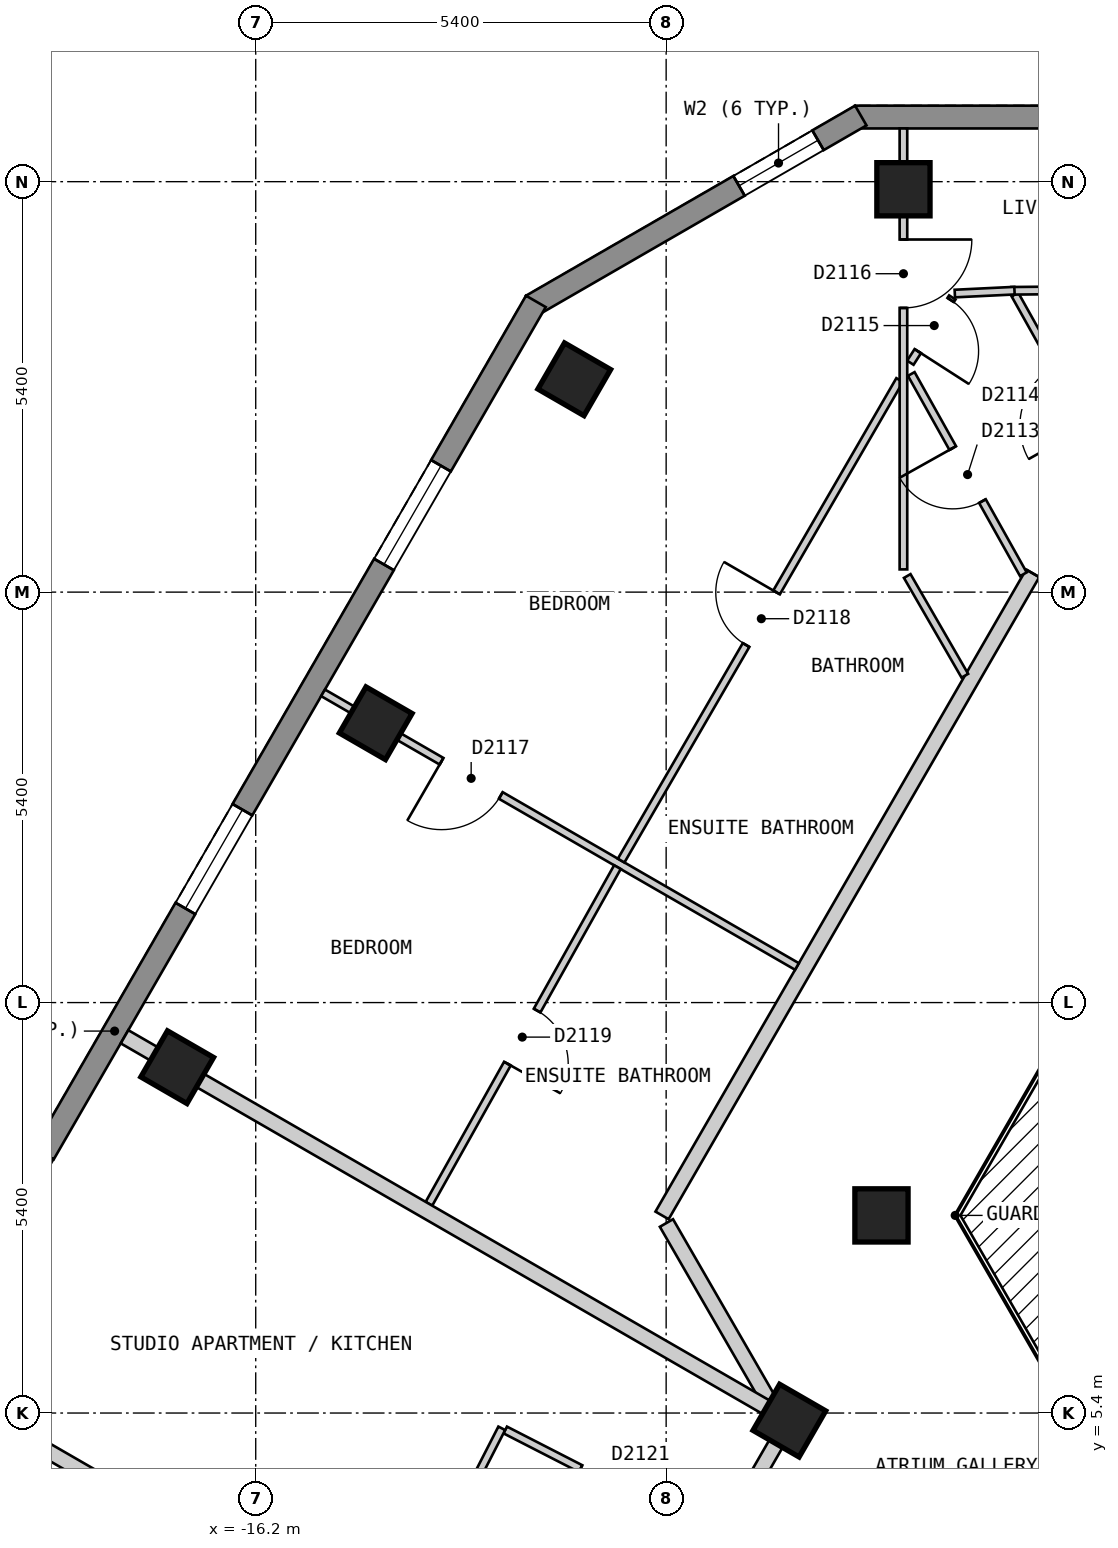
"""IFC4 building model, lengths in metres.
Left out: names, types, materials, properties, quantities, classifications, styles, units other than length and angle.
Written with IfcOpenShell. Run it as: python <this file> out.ifc"""

import sys

from ifc_helpers import new_model, si_unit, direction, frame, frame_2d, origin, origin_2d, place, context, subcontext, project, spatial, polyline, rectangle, outline, extrude, element, fill, save


model = new_model("IFC4")
c1 = context("Model", 3, precision=1e-05, world=origin(), true_north=direction((0.0, 1.0)))
c2 = subcontext(c1, "Body", "Model", "MODEL_VIEW")
j1 = project(units=[si_unit("LENGTHUNIT", "METRE"), si_unit("PLANEANGLEUNIT", "RADIAN")], contexts=[c1])
p1 = place(None, origin())
s1 = spatial("IfcSite", under=j1, at=p1, CompositionType="ELEMENT")
p2 = place(p1, origin())
s2 = spatial("IfcBuilding", under=s1, at=p2, CompositionType="ELEMENT")
p3 = place(p2, frame((0.0, 0.0, 211.8)))
s3 = spatial("IfcBuildingStorey", under=s2, at=p3, CompositionType="ELEMENT", Elevation=211.8)
for number, where, z_axis, x_axis in (
    (1, (-7.678, 21.5, 0.0), (0.0, 0.0, 1.0), (-1.0, 0.0, 0.0)),
    (2, (-12.009, 19.0, 0.0), (0.0, 0.0, 1.0), (-0.5, -0.866, 0.0)),
    (3, (-14.621, 14.475, 0.0), (0.0, 0.0, 1.0), (-0.5, -0.866, 0.0)),
    (4, (-17.233, 9.95, 0.0), (0.0, 0.0, 1.0), (-0.5, -0.866, 0.0)),
    (5, (-7.967, 8.0, 0.0), (0.0, 0.0, 1.0), (1.0, 0.0, 0.0)),
    (6, (-9.179, 5.3, 0.0), (0.0, 0.0, 1.0), (-0.5, -0.866, 0.0)),
):
    element("IfcColumn", number, at=place(p3, frame(where, z_axis=z_axis, x_axis=x_axis)), inside=s3, PredefinedType="COLUMN", context=c2, shape_type="SweptSolid", body=[
        extrude(rectangle(XDim=0.7, YDim=0.7, at=origin_2d()), origin(), (0.0, 0.0, 1.0), 3.0),
    ])
p4 = place(p3, frame((8.314, 22.45, 0.0), z_axis=(0.0, 0.0, 1.0), x_axis=(-1.0, 0.0, 0.0)))
e7 = element("IfcWall", 7, at=p4, inside=s3, PredefinedType="SOLIDWALL", context=c2, shape_type="SweptSolid", body=[
    extrude(outline(polyline([(0.0, -0.15), (16.628, -0.15), (16.548, 0.15), (0.08, 0.15), (0.0, -0.15)])), origin(), (0.0, 0.0, 1.0), 2.7),
])
p5 = place(p4, frame((2.444, 0.0, 0.15)))
e8 = element("IfcOpeningElement", 8, at=p5, cuts=e7, PredefinedType="OPENING", context=c2, shape_type="SweptSolid", body=[
    extrude(rectangle(XDim=1.5, YDim=2.1, at=frame_2d((0.75, 1.05))), frame((0.0, 0.16, 0.0), z_axis=(0.0, -1.0, 0.0), x_axis=(1.0, 0.0, 0.0)), (0.0, 0.0, 1.0), 0.32),
])
p6 = place(p4, frame((7.564, 0.0, 0.15)))
e9 = element("IfcOpeningElement", 9, at=p6, cuts=e7, PredefinedType="OPENING", context=c2, shape_type="SweptSolid", body=[
    extrude(rectangle(XDim=1.5, YDim=2.1, at=frame_2d((0.75, 1.05))), frame((0.0, 0.16, 0.0), z_axis=(0.0, -1.0, 0.0), x_axis=(1.0, 0.0, 0.0)), (0.0, 0.0, 1.0), 0.32),
])
p7 = place(p4, frame((12.683, 0.0, 0.15)))
e10 = element("IfcOpeningElement", 10, at=p7, cuts=e7, PredefinedType="OPENING", context=c2, shape_type="SweptSolid", body=[
    extrude(rectangle(XDim=1.5, YDim=2.1, at=frame_2d((0.75, 1.05))), frame((0.0, 0.16, 0.0), z_axis=(0.0, -1.0, 0.0), x_axis=(1.0, 0.0, 0.0)), (0.0, 0.0, 1.0), 0.32),
])
p8 = place(p3, frame((-8.239, 22.47, 0.0), z_axis=(0.0, 0.0, 1.0), x_axis=(-0.866022959057, -0.500004234368, 0.0)))
e11 = element("IfcWall", 11, at=p8, inside=s3, PredefinedType="SOLIDWALL", context=c2, shape_type="SweptSolid", body=[
    extrude(outline(polyline([(0.0, -0.15), (5.0, -0.15), (4.92, 0.15), (0.08, 0.15), (0.0, -0.15)])), origin(), (0.0, 0.0, 1.0), 2.7),
])
p9 = place(p8, frame((0.65, 0.0, 0.15)))
e12 = element("IfcOpeningElement", 12, at=p9, cuts=e11, PredefinedType="OPENING", context=c2, shape_type="SweptSolid", body=[
    extrude(rectangle(XDim=1.2, YDim=2.1, at=frame_2d((0.6, 1.05))), frame((0.0, 0.16, 0.0), z_axis=(0.0, -1.0, 0.0), x_axis=(1.0, 0.0, 0.0)), (0.0, 0.0, 1.0), 0.32),
])
p10 = place(p3, frame((-12.514, 20.025, 0.0), z_axis=(0.0, 0.0, 1.0), x_axis=(-0.500003656944, -0.866023292436, 0.0)))
e13 = element("IfcWall", 13, at=p10, inside=s3, PredefinedType="SOLIDWALL", context=c2, shape_type="SweptSolid", body=[
    extrude(outline(polyline([(0.0, -0.15), (22.17, -0.15), (22.09, 0.15), (0.08, 0.15), (0.0, -0.15)])), origin(), (0.0, 0.0, 1.0), 2.7),
])
p11 = place(p10, frame((2.497, 0.0, 0.15)))
e14 = element("IfcOpeningElement", 14, at=p11, cuts=e13, PredefinedType="OPENING", context=c2, shape_type="SweptSolid", body=[
    extrude(rectangle(XDim=1.5, YDim=2.1, at=frame_2d((0.75, 1.05))), frame((0.0, 0.16, 0.0), z_axis=(0.0, -1.0, 0.0), x_axis=(1.0, 0.0, 0.0)), (0.0, 0.0, 1.0), 0.32),
])
p12 = place(p10, frame((7.722, 0.0, 0.15)))
e15 = element("IfcOpeningElement", 15, at=p12, cuts=e13, PredefinedType="OPENING", context=c2, shape_type="SweptSolid", body=[
    extrude(rectangle(XDim=1.5, YDim=2.1, at=frame_2d((0.75, 1.05))), frame((0.0, 0.16, 0.0), z_axis=(0.0, -1.0, 0.0), x_axis=(1.0, 0.0, 0.0)), (0.0, 0.0, 1.0), 0.32),
])
p13 = place(p10, frame((12.948, 0.0, 0.15)))
e16 = element("IfcOpeningElement", 16, at=p13, cuts=e13, PredefinedType="OPENING", context=c2, shape_type="SweptSolid", body=[
    extrude(rectangle(XDim=1.5, YDim=2.1, at=frame_2d((0.75, 1.05))), frame((0.0, 0.16, 0.0), z_axis=(0.0, -1.0, 0.0), x_axis=(1.0, 0.0, 0.0)), (0.0, 0.0, 1.0), 0.32),
])
p14 = place(p10, frame((18.173, 0.0, 0.15)))
e17 = element("IfcOpeningElement", 17, at=p14, cuts=e13, PredefinedType="OPENING", context=c2, shape_type="SweptSolid", body=[
    extrude(rectangle(XDim=1.5, YDim=2.1, at=frame_2d((0.75, 1.05))), frame((0.0, 0.16, 0.0), z_axis=(0.0, -1.0, 0.0), x_axis=(1.0, 0.0, 0.0)), (0.0, 0.0, 1.0), 0.32),
])
p15 = place(p3, frame((-10.796, 7.9, 0.0), z_axis=(0.0, 0.0, 1.0), x_axis=(0.499698840221, -0.866199208659, 0.0)))
e18 = element("IfcWall", 18, at=p15, inside=s3, PredefinedType="PARTITIONING", context=c2, shape_type="SweptSolid", body=[
    extrude(rectangle(XDim=2.685, YDim=0.2, at=frame_2d((1.343, 0.0))), origin(), (0.0, 0.0, 1.0), 2.7),
])
p16 = place(p3, frame((-13.106, -1.5, 0.0), z_axis=(0.0, 0.0, 1.0), x_axis=(0.500025705601, 0.86601056214, 0.0)))
e19 = element("IfcWall", 19, at=p16, inside=s3, PredefinedType="PARTITIONING", context=c2, shape_type="SweptSolid", body=[
    extrude(rectangle(XDim=7.735, YDim=0.2, at=frame_2d((3.868, 0.0))), origin(), (0.0, 0.0, 1.0), 2.7),
])
p17 = place(p16, frame((4.748, 0.0, 0.0)))
e20 = element("IfcOpeningElement", 20, at=p17, cuts=e19, PredefinedType="OPENING", context=c2, shape_type="SweptSolid", body=[
    extrude(rectangle(XDim=1.0, YDim=2.1, at=frame_2d((0.5, 1.05))), frame((0.0, 0.11, 0.0), z_axis=(0.0, -1.0, 0.0), x_axis=(1.0, 0.0, 0.0)), (0.0, 0.0, 1.0), 0.22),
])
p18 = place(p3, frame((-10.854, 8.0, 0.0), z_axis=(0.0, 0.0, 1.0), x_axis=(0.499997637144, 0.866026767976, 0.0)))
e21 = element("IfcWall", 21, at=p18, inside=s3, PredefinedType="PARTITIONING", context=c2, shape_type="SweptSolid", body=[
    extrude(rectangle(XDim=10.854, YDim=0.2, at=frame_2d((5.427, 0.0))), origin(), (0.0, 0.0, 1.0), 2.7),
])
p19 = place(p18, frame((9.754, 0.0, 0.0)))
e22 = element("IfcOpeningElement", 22, at=p19, cuts=e21, PredefinedType="OPENING", context=c2, shape_type="SweptSolid", body=[
    extrude(rectangle(XDim=1.0, YDim=2.1, at=frame_2d((0.5, 1.05))), frame((0.0, 0.11, 0.0), z_axis=(0.0, -1.0, 0.0), x_axis=(1.0, 0.0, 0.0)), (0.0, 0.0, 1.0), 0.22),
])
p20 = place(p3, frame((-7.628, 16.412, 0.0), z_axis=(0.0, 0.0, 1.0), x_axis=(0.500159472144, -0.86593331292, 0.0)))
e23 = element("IfcWall", 23, at=p20, inside=s3, PredefinedType="PARTITIONING", context=c2, shape_type="SweptSolid", body=[
    extrude(rectangle(XDim=1.515, YDim=0.1, at=frame_2d((0.758, 0.0))), origin(), (0.0, 0.0, 1.0), 2.7),
])
p21 = place(p3, frame((-6.211, 20.115, 0.0), z_axis=(0.0, 0.0, 1.0), x_axis=(0.488221234931, -0.872719901092, 0.0)))
e24 = element("IfcWall", 24, at=p21, inside=s3, PredefinedType="PARTITIONING", context=c2, shape_type="SweptSolid", body=[
    extrude(rectangle(XDim=2.996, YDim=0.1, at=frame_2d((1.498, 0.0))), origin(), (0.0, 0.0, 1.0), 2.7),
])
p22 = place(p21, frame((1.077, 0.0, 0.0)))
e25 = element("IfcOpeningElement", 25, at=p22, cuts=e24, PredefinedType="OPENING", context=c2, shape_type="SweptSolid", body=[
    extrude(rectangle(XDim=0.9, YDim=2.1, at=frame_2d((0.45, 1.05))), frame((0.0, 0.06, 0.0), z_axis=(0.0, -1.0, 0.0), x_axis=(1.0, 0.0, 0.0)), (0.0, 0.0, 1.0), 0.12),
])
p23 = place(p3, frame((-7.575, 19.07, 0.0), z_axis=(0.0, 0.0, 1.0), x_axis=(0.488413788688, -0.872612153834, 0.0)))
e26 = element("IfcWall", 26, at=p23, inside=s3, PredefinedType="PARTITIONING", context=c2, shape_type="SweptSolid", body=[
    extrude(rectangle(XDim=3.02, YDim=0.1, at=frame_2d((1.51, 0.0))), origin(), (0.0, 0.0, 1.0), 2.7),
])
p24 = place(p23, frame((1.117, 0.0, 0.0)))
e27 = element("IfcOpeningElement", 27, at=p24, cuts=e26, PredefinedType="OPENING", context=c2, shape_type="SweptSolid", body=[
    extrude(rectangle(XDim=0.8, YDim=2.1, at=frame_2d((0.4, 1.05))), frame((0.0, 0.06, 0.0), z_axis=(0.0, -1.0, 0.0), x_axis=(1.0, 0.0, 0.0)), (0.0, 0.0, 1.0), 0.12),
])
p25 = place(p3, frame((-12.917, 5.177, 0.0), z_axis=(0.0, 0.0, 1.0), x_axis=(0.889829844516, -0.456292502467, 0.0)))
e28 = element("IfcWall", 28, at=p25, inside=s3, PredefinedType="PARTITIONING", context=c2, shape_type="SweptSolid", body=[
    extrude(rectangle(XDim=3.079, YDim=0.1, at=frame_2d((1.54, 0.0))), origin(), (0.0, 0.0, 1.0), 2.7),
])
p26 = place(p25, frame((1.114, 0.0, 0.0)))
e29 = element("IfcOpeningElement", 29, at=p26, cuts=e28, PredefinedType="OPENING", context=c2, shape_type="SweptSolid", body=[
    extrude(rectangle(XDim=0.9, YDim=2.1, at=frame_2d((0.45, 1.05))), frame((0.0, 0.06, 0.0), z_axis=(0.0, -1.0, 0.0), x_axis=(1.0, 0.0, 0.0)), (0.0, 0.0, 1.0), 0.12),
])
p27 = place(p3, frame((-15.314, 14.875, 0.0), z_axis=(0.0, 0.0, 1.0), x_axis=(0.866001485781, -0.500041424909, 0.0)))
e30 = element("IfcWall", 30, at=p27, inside=s3, PredefinedType="PARTITIONING", context=c2, shape_type="SweptSolid", body=[
    extrude(rectangle(XDim=7.2, YDim=0.1, at=frame_2d((3.6, 0.0))), origin(), (0.0, 0.0, 1.0), 2.7),
])
p28 = place(p27, frame((1.8, 0.0, 0.0)))
e31 = element("IfcOpeningElement", 31, at=p28, cuts=e30, PredefinedType="OPENING", context=c2, shape_type="SweptSolid", body=[
    extrude(rectangle(XDim=0.9, YDim=2.1, at=frame_2d((0.45, 1.05))), frame((0.0, 0.06, 0.0), z_axis=(0.0, -1.0, 0.0), x_axis=(1.0, 0.0, 0.0)), (0.0, 0.0, 1.0), 0.12),
])
p29 = place(p3, frame((-6.259, 20.164, 0.0), z_axis=(0.0, 0.0, 1.0), x_axis=(0.999952982126, 0.009697089139, 0.0)))
e32 = element("IfcWall", 32, at=p29, inside=s3, PredefinedType="PARTITIONING", context=c2, shape_type="SweptSolid", body=[
    extrude(rectangle(XDim=3.6, YDim=0.1, at=frame_2d((1.8, 0.0))), origin(), (0.0, 0.0, 1.0), 2.7),
])
p30 = place(p3, frame((-7.587, 19.218, 0.0), z_axis=(0.0, 0.0, 1.0), x_axis=(0.54066090195, 0.841240624972, 0.0)))
e33 = element("IfcWall", 33, at=p30, inside=s3, PredefinedType="PARTITIONING", context=c2, shape_type="SweptSolid", body=[
    extrude(rectangle(XDim=1.021, YDim=0.1, at=frame_2d((0.51, 0.0))), origin(), (0.0, 0.0, 1.0), 2.7),
])
p31 = place(p30, frame((0.181, 0.0, 0.0)))
e34 = element("IfcOpeningElement", 34, at=p31, cuts=e33, PredefinedType="OPENING", context=c2, shape_type="SweptSolid", body=[
    extrude(rectangle(XDim=0.8, YDim=2.1, at=frame_2d((0.4, 1.05))), frame((0.0, 0.06, 0.0), z_axis=(0.0, -1.0, 0.0), x_axis=(1.0, 0.0, 0.0)), (0.0, 0.0, 1.0), 0.12),
])
p32 = place(p3, frame((-11.392, 12.668, 0.0), z_axis=(0.0, 0.0, 1.0), x_axis=(0.501440551074, 0.865192102217, 0.0)))
e35 = element("IfcWall", 35, at=p32, inside=s3, PredefinedType="PARTITIONING", context=c2, shape_type="SweptSolid", body=[
    extrude(rectangle(XDim=7.307, YDim=0.1, at=frame_2d((3.654, 0.0))), origin(), (0.0, 0.0, 1.0), 2.7),
])
p33 = place(p32, frame((3.278, 0.0, 0.0)))
e36 = element("IfcOpeningElement", 36, at=p33, cuts=e35, PredefinedType="OPENING", context=c2, shape_type="SweptSolid", body=[
    extrude(rectangle(XDim=0.8, YDim=2.1, at=frame_2d((0.4, 1.05))), frame((0.0, 0.06, 0.0), z_axis=(0.0, -1.0, 0.0), x_axis=(1.0, 0.0, 0.0)), (0.0, 0.0, 1.0), 0.12),
])
p34 = place(p3, frame((-13.921, 8.153, 0.0), z_axis=(0.0, 0.0, 1.0), x_axis=(0.488568218554, 0.872525699231, 0.0)))
e37 = element("IfcWall", 37, at=p34, inside=s3, PredefinedType="PARTITIONING", context=c2, shape_type="SweptSolid", body=[
    extrude(rectangle(XDim=5.076, YDim=0.1, at=frame_2d((2.538, 0.0))), origin(), (0.0, 0.0, 1.0), 2.7),
])
p35 = place(p34, frame((2.113, 0.0, 0.0)))
e38 = element("IfcOpeningElement", 38, at=p35, cuts=e37, PredefinedType="OPENING", context=c2, shape_type="SweptSolid", body=[
    extrude(rectangle(XDim=0.8, YDim=2.1, at=frame_2d((0.4, 1.05))), frame((0.0, 0.06, 0.0), z_axis=(0.0, -1.0, 0.0), x_axis=(1.0, 0.0, 0.0)), (0.0, 0.0, 1.0), 0.12),
])
p36 = place(p3, frame((-14.399, 2.396, 0.0), z_axis=(0.0, 0.0, 1.0), x_axis=(0.455967231787, 0.889996563778, 0.0)))
e39 = element("IfcWall", 39, at=p36, inside=s3, PredefinedType="PARTITIONING", context=c2, shape_type="SweptSolid", body=[
    extrude(rectangle(XDim=3.149, YDim=0.1, at=frame_2d((1.575, 0.0))), origin(), (0.0, 0.0, 1.0), 2.7),
])
p37 = place(p3, frame((-7.678, 16.499, 0.0), z_axis=(0.0, 0.0, 1.0), x_axis=(0.0, 1.0, 0.0)))
e40 = element("IfcWall", 40, at=p37, inside=s3, PredefinedType="PARTITIONING", context=c2, shape_type="SweptSolid", body=[
    extrude(rectangle(XDim=5.801, YDim=0.1, at=frame_2d((2.9, 0.0))), origin(), (0.0, 0.0, 1.0), 2.7),
])
p38 = place(p37, frame((3.44, 0.0, 0.0)))
e41 = element("IfcOpeningElement", 41, at=p38, cuts=e40, PredefinedType="OPENING", context=c2, shape_type="SweptSolid", body=[
    extrude(rectangle(XDim=0.9, YDim=2.1, at=frame_2d((0.45, 1.05))), frame((0.0, 0.06, 0.0), z_axis=(0.0, -1.0, 0.0), x_axis=(1.0, 0.0, 0.0)), (0.0, 0.0, 1.0), 0.12),
])
p39 = place(p3, frame((-7.002, 20.128, 0.0), z_axis=(0.0, 0.0, 1.0), x_axis=(0.998824855741, 0.048465529548, 0.0)))
e42 = element("IfcWall", 42, at=p39, inside=s3, PredefinedType="PARTITIONING", context=c2, shape_type="SweptSolid", body=[
    extrude(rectangle(XDim=0.786, YDim=0.1, at=frame_2d((0.393, 0.0))), origin(), (0.0, 0.0, 1.0), 2.7),
])
p40 = place(p3, frame((-20.539, 5.825, 0.0), z_axis=(0.0, 0.0, 1.0), x_axis=(0.866046068403, -0.499964206122, 0.0)))
e43 = element("IfcWall", 43, at=p40, inside=s3, PredefinedType="PARTITIONING", context=c2, shape_type="SweptSolid", body=[
    extrude(rectangle(XDim=9.995, YDim=0.2, at=frame_2d((4.998, 0.0))), origin(), (0.0, 0.0, 1.0), 2.7),
])
p41 = place(p3, frame((-17.926, 10.35, 0.0), z_axis=(0.0, 0.0, 1.0), x_axis=(0.866018411306, -0.500012111133, 0.0)))
e44 = element("IfcWall", 44, at=p41, inside=s3, PredefinedType="PARTITIONING", context=c2, shape_type="SweptSolid", body=[
    extrude(rectangle(XDim=9.898, YDim=0.2, at=frame_2d((4.949, 0.0))), origin(), (0.0, 0.0, 1.0), 2.7),
])
p42 = place(p9, origin())
e45 = element("IfcWindow", 45, at=p42, inside=s3, PartitioningType="SINGLE_PANEL", PredefinedType="WINDOW", context=c2, shape_type="SweptSolid", body=[
    extrude(rectangle(XDim=1.2, YDim=2.1, at=frame_2d((0.6, 1.05))), frame((0.0, 0.03, 0.0), z_axis=(0.0, -1.0, 0.0), x_axis=(1.0, 0.0, 0.0)), (0.0, 0.0, 1.0), 0.06),
])
fill(e12, e45)
p43 = place(p11, origin())
e46 = element("IfcWindow", 46, at=p43, inside=s3, PartitioningType="SINGLE_PANEL", PredefinedType="WINDOW", context=c2, shape_type="SweptSolid", body=[
    extrude(rectangle(XDim=1.5, YDim=2.1, at=frame_2d((0.75, 1.05))), frame((0.0, 0.03, 0.0), z_axis=(0.0, -1.0, 0.0), x_axis=(1.0, 0.0, 0.0)), (0.0, 0.0, 1.0), 0.06),
])
fill(e14, e46)
p44 = place(p12, origin())
e47 = element("IfcWindow", 47, at=p44, inside=s3, PartitioningType="SINGLE_PANEL", PredefinedType="WINDOW", context=c2, shape_type="SweptSolid", body=[
    extrude(rectangle(XDim=1.5, YDim=2.1, at=frame_2d((0.75, 1.05))), frame((0.0, 0.03, 0.0), z_axis=(0.0, -1.0, 0.0), x_axis=(1.0, 0.0, 0.0)), (0.0, 0.0, 1.0), 0.06),
])
fill(e15, e47)
p45 = place(p19, origin())
e48 = element("IfcDoor", 48, at=p45, inside=s3, OperationType="SINGLE_SWING_RIGHT", PredefinedType="DOOR", context=c2, shape_type="SweptSolid", body=[
    extrude(rectangle(XDim=1.0, YDim=2.1, at=frame_2d((0.5, 1.05))), frame((0.0, 0.025, 0.0), z_axis=(0.0, -1.0, 0.0), x_axis=(1.0, 0.0, 0.0)), (0.0, 0.0, 1.0), 0.05),
])
fill(e22, e48)
p46 = place(p24, origin())
e49 = element("IfcDoor", 49, at=p46, inside=s3, OperationType="SINGLE_SWING_LEFT", PredefinedType="DOOR", context=c2, shape_type="SweptSolid", body=[
    extrude(rectangle(XDim=0.8, YDim=2.1, at=frame_2d((0.4, 1.05))), frame((0.0, 0.025, 0.0), z_axis=(0.0, -1.0, 0.0), x_axis=(1.0, 0.0, 0.0)), (0.0, 0.0, 1.0), 0.05),
])
fill(e27, e49)
p47 = place(p31, origin())
e50 = element("IfcDoor", 50, at=p47, inside=s3, OperationType="SINGLE_SWING_LEFT", PredefinedType="DOOR", context=c2, shape_type="SweptSolid", body=[
    extrude(rectangle(XDim=0.8, YDim=2.1, at=frame_2d((0.4, 1.05))), frame((0.0, 0.025, 0.0), z_axis=(0.0, -1.0, 0.0), x_axis=(1.0, 0.0, 0.0)), (0.0, 0.0, 1.0), 0.05),
])
fill(e34, e50)
p48 = place(p38, origin())
e51 = element("IfcDoor", 51, at=p48, inside=s3, OperationType="SINGLE_SWING_RIGHT", PredefinedType="DOOR", context=c2, shape_type="SweptSolid", body=[
    extrude(rectangle(XDim=0.9, YDim=2.1, at=frame_2d((0.45, 1.05))), frame((0.0, 0.025, 0.0), z_axis=(0.0, -1.0, 0.0), x_axis=(1.0, 0.0, 0.0)), (0.0, 0.0, 1.0), 0.05),
])
fill(e41, e51)
p49 = place(p28, origin())
e52 = element("IfcDoor", 52, at=p49, inside=s3, OperationType="SINGLE_SWING_LEFT", PredefinedType="DOOR", context=c2, shape_type="SweptSolid", body=[
    extrude(rectangle(XDim=0.9, YDim=2.1, at=frame_2d((0.45, 1.05))), frame((0.0, 0.025, 0.0), z_axis=(0.0, -1.0, 0.0), x_axis=(1.0, 0.0, 0.0)), (0.0, 0.0, 1.0), 0.05),
])
fill(e31, e52)
p50 = place(p33, origin())
e53 = element("IfcDoor", 53, at=p50, inside=s3, OperationType="SINGLE_SWING_RIGHT", PredefinedType="DOOR", context=c2, shape_type="SweptSolid", body=[
    extrude(rectangle(XDim=0.8, YDim=2.1, at=frame_2d((0.4, 1.05))), frame((0.0, 0.025, 0.0), z_axis=(0.0, -1.0, 0.0), x_axis=(1.0, 0.0, 0.0)), (0.0, 0.0, 1.0), 0.05),
])
fill(e36, e53)
p51 = place(p35, origin())
e54 = element("IfcDoor", 54, at=p51, inside=s3, OperationType="SINGLE_SWING_LEFT", PredefinedType="DOOR", context=c2, shape_type="SweptSolid", body=[
    extrude(rectangle(XDim=0.8, YDim=2.1, at=frame_2d((0.4, 1.05))), frame((0.0, 0.025, 0.0), z_axis=(0.0, -1.0, 0.0), x_axis=(1.0, 0.0, 0.0)), (0.0, 0.0, 1.0), 0.05),
])
fill(e38, e54)
p52 = place(p26, origin())
e55 = element("IfcDoor", 55, at=p52, inside=s3, OperationType="SINGLE_SWING_LEFT", PredefinedType="DOOR", context=c2, shape_type="SweptSolid", body=[
    extrude(rectangle(XDim=0.9, YDim=2.1, at=frame_2d((0.45, 1.05))), frame((0.0, 0.025, 0.0), z_axis=(0.0, -1.0, 0.0), x_axis=(1.0, 0.0, 0.0)), (0.0, 0.0, 1.0), 0.05),
])
fill(e29, e55)
save(model, sys.argv[1])
